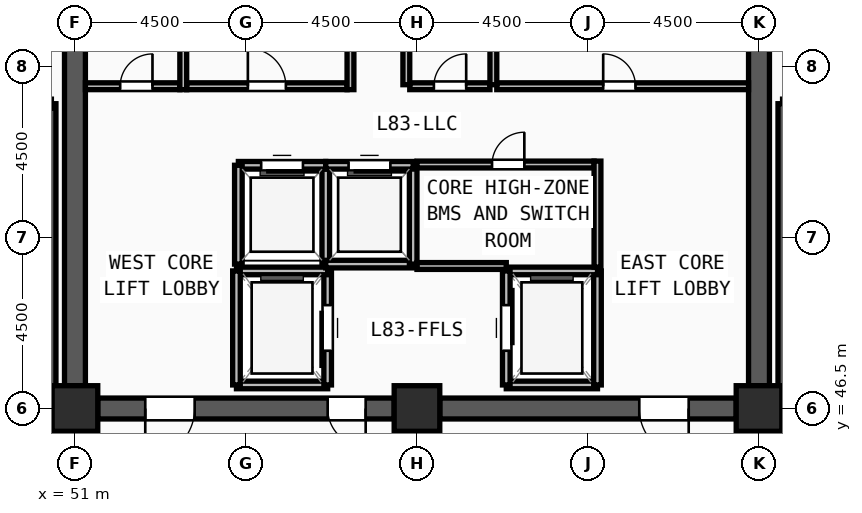
"""IFC4 building model, lengths in metres.
Left out: names, types, materials, properties, quantities, classifications, styles, units other than length and angle.
Written with IfcOpenShell. Run it as: python <this file> out.ifc"""

import sys

from ifc_helpers import new_model, si_unit, direction, frame, frame_2d, origin, origin_2d, place, context, subcontext, project, spatial, rectangle, extrude, source, transform, mapped, element, fill, save


model = new_model("IFC4")
c1 = context("Model", 3, precision=1e-05, world=origin(), true_north=direction((0.0, 1.0)))
c2 = subcontext(c1, "Body", "Model", "MODEL_VIEW")
j1 = project(units=[si_unit("LENGTHUNIT", "METRE"), si_unit("PLANEANGLEUNIT", "RADIAN")], contexts=[c1])
p1 = place(None, origin())
s1 = spatial("IfcSite", under=j1, at=p1, CompositionType="ELEMENT")
p2 = place(p1, origin())
s2 = spatial("IfcBuilding", under=s1, at=p2, CompositionType="ELEMENT")
p3 = place(p2, frame((0.0, 0.0, 320.25)))
s3 = spatial("IfcBuildingStorey", under=s2, at=p3, CompositionType="ELEMENT", Elevation=320.25)
m1 = source(origin(), c2, "Body", "SweptSolid", [
    extrude(rectangle(XDim=1.2, YDim=1.2, at=origin_2d()), origin(), (0.0, 0.0, 1.0), 3.75),
])
for number, where, z_axis, x_axis in (
    (1, (51.0, 46.5, 0.0), (0.0, 0.0, 1.0), (1.0, 0.0, 0.0)),
    (2, (60.0, 46.5, 0.0), (0.0, 0.0, 1.0), (1.0, 0.0, 0.0)),
    (3, (69.0, 46.5, 0.0), (0.0, 0.0, 1.0), (1.0, 0.0, 0.0)),
):
    element("IfcColumn", number, at=place(p3, frame(where, z_axis=z_axis, x_axis=x_axis)), inside=s3, PredefinedType="COLUMN", context=c2, shape_type="MappedRepresentation", body=[
        mapped(m1, transform((0.0, 0.0, 0.0), x_axis=(1.0, 0.0, 0.0), y_axis=(0.0, 1.0, 0.0), z_axis=(0.0, 0.0, 1.0), scale=1.0)),
    ])
p4 = place(p3, frame((69.0, 60.9, 0.0), z_axis=(0.0, 0.0, 1.0), x_axis=(0.0, -1.0, 0.0)))
e4 = element("IfcWall", 4, at=p4, inside=s3, PredefinedType="SHEAR", context=c2, shape_type="SweptSolid", body=[
    extrude(rectangle(XDim=13.8, YDim=0.55, at=frame_2d((6.9, 0.0))), origin(), (0.0, 0.0, 1.0), 3.47),
])
m2 = source(origin(), c2, "Body", "SweptSolid", [
    extrude(rectangle(XDim=1.2, YDim=2.2, at=frame_2d((0.6, 1.1))), frame((0.0, 0.285, 0.0), z_axis=(0.0, -1.0, 0.0), x_axis=(1.0, 0.0, 0.0)), (0.0, 0.0, 1.0), 0.57),
])
p5 = place(p4, frame((1.35, 0.0, 0.0)))
e5 = element("IfcOpeningElement", 5, at=p5, cuts=e4, PredefinedType="OPENING", context=c2, shape_type="MappedRepresentation", body=[
    mapped(m2, transform((0.0, 0.0, 0.0), x_axis=(1.0, 0.0, 0.0), y_axis=(0.0, 1.0, 0.0), z_axis=(0.0, 0.0, 1.0), scale=1.0)),
])
p6 = place(p3, frame((68.4, 46.5, 0.0), z_axis=(0.0, 0.0, 1.0), x_axis=(-1.0, 0.0, 0.0)))
e6 = element("IfcWall", 6, at=p6, inside=s3, PredefinedType="SHEAR", context=c2, shape_type="SweptSolid", body=[
    extrude(rectangle(XDim=7.8, YDim=0.55, at=frame_2d((3.9, 0.0))), origin(), (0.0, 0.0, 1.0), 3.47),
])
m3 = source(origin(), c2, "Body", "SweptSolid", [
    extrude(rectangle(XDim=1.3, YDim=2.2, at=frame_2d((0.65, 1.1))), frame((0.0, 0.285, 0.0), z_axis=(0.0, -1.0, 0.0), x_axis=(1.0, 0.0, 0.0)), (0.0, 0.0, 1.0), 0.57),
])
p7 = place(p6, frame((1.25, 0.0, 0.0)))
e7 = element("IfcOpeningElement", 7, at=p7, cuts=e6, PredefinedType="OPENING", context=c2, shape_type="MappedRepresentation", body=[
    mapped(m3, transform((0.0, 0.0, 0.0), x_axis=(1.0, 0.0, 0.0), y_axis=(0.0, 1.0, 0.0), z_axis=(0.0, 0.0, 1.0), scale=1.0)),
])
p8 = place(p3, frame((59.4, 46.5, 0.0), z_axis=(0.0, 0.0, 1.0), x_axis=(-1.0, 0.0, 0.0)))
e8 = element("IfcWall", 8, at=p8, inside=s3, PredefinedType="SHEAR", context=c2, shape_type="SweptSolid", body=[
    extrude(rectangle(XDim=7.8, YDim=0.55, at=frame_2d((3.9, 0.0))), origin(), (0.0, 0.0, 1.0), 3.47),
])
p9 = place(p8, frame((5.25, 0.0, 0.0)))
e9 = element("IfcOpeningElement", 9, at=p9, cuts=e8, PredefinedType="OPENING", context=c2, shape_type="MappedRepresentation", body=[
    mapped(m3, transform((0.0, 0.0, 0.0), x_axis=(1.0, 0.0, 0.0), y_axis=(0.0, 1.0, 0.0), z_axis=(0.0, 0.0, 1.0), scale=1.0)),
])
m4 = source(origin(), c2, "Body", "SweptSolid", [
    extrude(rectangle(XDim=1.0, YDim=2.2, at=frame_2d((0.5, 1.1))), frame((0.0, 0.285, 0.0), z_axis=(0.0, -1.0, 0.0), x_axis=(1.0, 0.0, 0.0)), (0.0, 0.0, 1.0), 0.57),
])
p10 = place(p8, frame((0.75, 0.0, 0.0)))
e10 = element("IfcOpeningElement", 10, at=p10, cuts=e8, PredefinedType="OPENING", context=c2, shape_type="MappedRepresentation", body=[
    mapped(m4, transform((0.0, 0.0, 0.0), x_axis=(1.0, 0.0, 0.0), y_axis=(0.0, 1.0, 0.0), z_axis=(0.0, 0.0, 1.0), scale=1.0)),
])
p11 = place(p3, frame((51.0, 47.1, 0.0), z_axis=(0.0, 0.0, 1.0), x_axis=(0.0, 1.0, 0.0)))
e11 = element("IfcWall", 11, at=p11, inside=s3, PredefinedType="SHEAR", context=c2, shape_type="SweptSolid", body=[
    extrude(rectangle(XDim=13.8, YDim=0.55, at=frame_2d((6.9, 0.0))), origin(), (0.0, 0.0, 1.0), 3.47),
])
for number, where, z_axis, x_axis in (
    (12, (50.38, 46.7, 0.0), (0.0, 0.0, 1.0), (0.0, 1.0, 0.0)),
    (13, (69.62, 54.52, 0.0), (0.0, 0.0, 1.0), (0.0, -1.0, 0.0)),
):
    element("IfcWall", number, at=place(p3, frame(where, z_axis=z_axis, x_axis=x_axis)), inside=s3, PredefinedType="SOLIDWALL", context=c2, shape_type="SweptSolid", body=[
        extrude(rectangle(XDim=7.82, YDim=0.24, at=frame_2d((3.91, 0.0))), origin(), (0.0, 0.0, 1.0), 3.47),
    ])
p12 = place(p3, frame((55.25, 47.12, 0.0), z_axis=(0.0, 0.0, 1.0), x_axis=(1.0, 0.0, 0.0)))
e14 = element("IfcWall", 14, at=p12, inside=s3, PredefinedType="SOLIDWALL", context=c2, shape_type="SweptSolid", body=[
    extrude(rectangle(XDim=2.4, YDim=0.2, at=frame_2d((1.2, 0.0))), origin(), (0.0, 0.0, 1.0), 3.47),
])
p13 = place(p3, frame((57.65, 47.12, 0.0), z_axis=(0.0, 0.0, 1.0), x_axis=(0.0, 1.0, 0.0)))
e15 = element("IfcWall", 15, at=p13, inside=s3, PredefinedType="SOLIDWALL", context=c2, shape_type="SweptSolid", body=[
    extrude(rectangle(XDim=3.0, YDim=0.2, at=frame_2d((1.5, 0.0))), origin(), (0.0, 0.0, 1.0), 3.47),
])
m5 = source(origin(), c2, "Body", "SweptSolid", [
    extrude(rectangle(XDim=1.2, YDim=2.3, at=frame_2d((0.6, 1.15))), frame((0.0, 0.11, 0.0), z_axis=(0.0, -1.0, 0.0), x_axis=(1.0, 0.0, 0.0)), (0.0, 0.0, 1.0), 0.22),
])
p14 = place(p13, frame((0.9, 0.0, 0.0)))
e16 = element("IfcOpeningElement", 16, at=p14, cuts=e15, PredefinedType="OPENING", context=c2, shape_type="MappedRepresentation", body=[
    mapped(m5, transform((0.0, 0.0, 0.0), x_axis=(1.0, 0.0, 0.0), y_axis=(0.0, 1.0, 0.0), z_axis=(0.0, 0.0, 1.0), scale=1.0)),
])
p15 = place(p3, frame((57.65, 50.12, 0.0), z_axis=(0.0, 0.0, 1.0), x_axis=(-1.0, 0.0, 0.0)))
e17 = element("IfcWall", 17, at=p15, inside=s3, PredefinedType="SOLIDWALL", context=c2, shape_type="SweptSolid", body=[
    extrude(rectangle(XDim=2.4, YDim=0.2, at=frame_2d((1.2, 0.0))), origin(), (0.0, 0.0, 1.0), 3.47),
])
p16 = place(p3, frame((55.25, 50.12, 0.0), z_axis=(0.0, 0.0, 1.0), x_axis=(0.0, -1.0, 0.0)))
e18 = element("IfcWall", 18, at=p16, inside=s3, PredefinedType="SOLIDWALL", context=c2, shape_type="SweptSolid", body=[
    extrude(rectangle(XDim=3.0, YDim=0.2, at=frame_2d((1.5, 0.0))), origin(), (0.0, 0.0, 1.0), 3.47),
])
p17 = place(p3, frame((62.35, 47.12, 0.0), z_axis=(0.0, 0.0, 1.0), x_axis=(1.0, 0.0, 0.0)))
e19 = element("IfcWall", 19, at=p17, inside=s3, PredefinedType="SOLIDWALL", context=c2, shape_type="SweptSolid", body=[
    extrude(rectangle(XDim=2.4, YDim=0.2, at=frame_2d((1.2, 0.0))), origin(), (0.0, 0.0, 1.0), 3.47),
])
p18 = place(p3, frame((64.75, 47.12, 0.0), z_axis=(0.0, 0.0, 1.0), x_axis=(0.0, 1.0, 0.0)))
e20 = element("IfcWall", 20, at=p18, inside=s3, PredefinedType="SOLIDWALL", context=c2, shape_type="SweptSolid", body=[
    extrude(rectangle(XDim=3.0, YDim=0.2, at=frame_2d((1.5, 0.0))), origin(), (0.0, 0.0, 1.0), 3.47),
])
p19 = place(p3, frame((64.75, 50.12, 0.0), z_axis=(0.0, 0.0, 1.0), x_axis=(-1.0, 0.0, 0.0)))
e21 = element("IfcWall", 21, at=p19, inside=s3, PredefinedType="SOLIDWALL", context=c2, shape_type="SweptSolid", body=[
    extrude(rectangle(XDim=2.4, YDim=0.2, at=frame_2d((1.2, 0.0))), origin(), (0.0, 0.0, 1.0), 3.47),
])
p20 = place(p3, frame((62.35, 50.12, 0.0), z_axis=(0.0, 0.0, 1.0), x_axis=(0.0, -1.0, 0.0)))
e22 = element("IfcWall", 22, at=p20, inside=s3, PredefinedType="SOLIDWALL", context=c2, shape_type="SweptSolid", body=[
    extrude(rectangle(XDim=3.0, YDim=0.2, at=frame_2d((1.5, 0.0))), origin(), (0.0, 0.0, 1.0), 3.47),
])
p21 = place(p20, frame((0.9, 0.0, 0.0)))
e23 = element("IfcOpeningElement", 23, at=p21, cuts=e22, PredefinedType="OPENING", context=c2, shape_type="MappedRepresentation", body=[
    mapped(m5, transform((0.0, 0.0, 0.0), x_axis=(1.0, 0.0, 0.0), y_axis=(0.0, 1.0, 0.0), z_axis=(0.0, 0.0, 1.0), scale=1.0)),
])
p22 = place(p3, frame((57.6, 50.3, 0.0), z_axis=(0.0, 0.0, 1.0), x_axis=(0.0, 1.0, 0.0)))
e24 = element("IfcWall", 24, at=p22, inside=s3, PredefinedType="SOLIDWALL", context=c2, shape_type="SweptSolid", body=[
    extrude(rectangle(XDim=2.6, YDim=0.2, at=frame_2d((1.3, 0.0))), origin(), (0.0, 0.0, 1.0), 3.47),
])
p23 = place(p3, frame((57.6, 52.9, 0.0), z_axis=(0.0, 0.0, 1.0), x_axis=(-1.0, 0.0, 0.0)))
e25 = element("IfcWall", 25, at=p23, inside=s3, PredefinedType="SOLIDWALL", context=c2, shape_type="SweptSolid", body=[
    extrude(rectangle(XDim=2.3, YDim=0.2, at=frame_2d((1.15, 0.0))), origin(), (0.0, 0.0, 1.0), 3.47),
])
m6 = source(origin(), c2, "Body", "SweptSolid", [
    extrude(rectangle(XDim=1.1, YDim=2.2, at=frame_2d((0.55, 1.1))), frame((0.0, 0.11, 0.0), z_axis=(0.0, -1.0, 0.0), x_axis=(1.0, 0.0, 0.0)), (0.0, 0.0, 1.0), 0.22),
])
p24 = place(p23, frame((0.6, 0.0, 0.0)))
e26 = element("IfcOpeningElement", 26, at=p24, cuts=e25, PredefinedType="OPENING", context=c2, shape_type="MappedRepresentation", body=[
    mapped(m6, transform((0.0, 0.0, 0.0), x_axis=(1.0, 0.0, 0.0), y_axis=(0.0, 1.0, 0.0), z_axis=(0.0, 0.0, 1.0), scale=1.0)),
])
p25 = place(p3, frame((55.3, 52.9, 0.0), z_axis=(0.0, 0.0, 1.0), x_axis=(0.0, -1.0, 0.0)))
e27 = element("IfcWall", 27, at=p25, inside=s3, PredefinedType="SOLIDWALL", context=c2, shape_type="SweptSolid", body=[
    extrude(rectangle(XDim=2.6, YDim=0.2, at=frame_2d((1.3, 0.0))), origin(), (0.0, 0.0, 1.0), 3.47),
])
p26 = place(p3, frame((57.6, 50.3, 0.0), z_axis=(0.0, 0.0, 1.0), x_axis=(1.0, 0.0, 0.0)))
e28 = element("IfcWall", 28, at=p26, inside=s3, PredefinedType="SOLIDWALL", context=c2, shape_type="SweptSolid", body=[
    extrude(rectangle(XDim=2.3, YDim=0.2, at=frame_2d((1.15, 0.0))), origin(), (0.0, 0.0, 1.0), 3.47),
])
p27 = place(p3, frame((59.9, 50.3, 0.0), z_axis=(0.0, 0.0, 1.0), x_axis=(0.0, 1.0, 0.0)))
e29 = element("IfcWall", 29, at=p27, inside=s3, PredefinedType="SOLIDWALL", context=c2, shape_type="SweptSolid", body=[
    extrude(rectangle(XDim=2.6, YDim=0.2, at=frame_2d((1.3, 0.0))), origin(), (0.0, 0.0, 1.0), 3.47),
])
p28 = place(p3, frame((59.9, 52.9, 0.0), z_axis=(0.0, 0.0, 1.0), x_axis=(-1.0, 0.0, 0.0)))
e30 = element("IfcWall", 30, at=p28, inside=s3, PredefinedType="SOLIDWALL", context=c2, shape_type="SweptSolid", body=[
    extrude(rectangle(XDim=2.3, YDim=0.2, at=frame_2d((1.15, 0.0))), origin(), (0.0, 0.0, 1.0), 3.47),
])
p29 = place(p28, frame((0.6, 0.0, 0.0)))
e31 = element("IfcOpeningElement", 31, at=p29, cuts=e30, PredefinedType="OPENING", context=c2, shape_type="MappedRepresentation", body=[
    mapped(m6, transform((0.0, 0.0, 0.0), x_axis=(1.0, 0.0, 0.0), y_axis=(0.0, 1.0, 0.0), z_axis=(0.0, 0.0, 1.0), scale=1.0)),
])
p30 = place(p3, frame((60.0, 52.92, 0.0), z_axis=(0.0, 0.0, 1.0), x_axis=(1.0, 0.0, 0.0)))
e32 = element("IfcWall", 32, at=p30, inside=s3, PredefinedType="PARTITIONING", context=c2, shape_type="SweptSolid", body=[
    extrude(rectangle(XDim=4.66, YDim=0.18, at=frame_2d((2.33, 0.0))), origin(), (0.0, 0.0, 1.0), 3.47),
])
m7 = source(origin(), c2, "Body", "SweptSolid", [
    extrude(rectangle(XDim=0.85, YDim=2.1, at=frame_2d((0.425, 1.05))), frame((0.0, 0.1, 0.0), z_axis=(0.0, -1.0, 0.0), x_axis=(1.0, 0.0, 0.0)), (0.0, 0.0, 1.0), 0.2),
])
p31 = place(p30, frame((1.975, 0.0, 0.0)))
e33 = element("IfcOpeningElement", 33, at=p31, cuts=e32, PredefinedType="OPENING", context=c2, shape_type="MappedRepresentation", body=[
    mapped(m7, transform((0.0, 0.0, 0.0), x_axis=(1.0, 0.0, 0.0), y_axis=(0.0, 1.0, 0.0), z_axis=(0.0, 0.0, 1.0), scale=1.0)),
])
p32 = place(p3, frame((53.94, 54.98, 0.0), z_axis=(0.0, 0.0, 1.0), x_axis=(1.0, 0.0, 0.0)))
e34 = element("IfcWall", 34, at=p32, inside=s3, PredefinedType="PARTITIONING", context=c2, shape_type="SweptSolid", body=[
    extrude(rectangle(XDim=4.22, YDim=0.18, at=frame_2d((2.11, 0.0))), origin(), (0.0, 0.0, 1.0), 3.47),
])
m8 = source(origin(), c2, "Body", "SweptSolid", [
    extrude(rectangle(XDim=1.0, YDim=2.2, at=frame_2d((0.5, 1.1))), frame((0.0, 0.1, 0.0), z_axis=(0.0, -1.0, 0.0), x_axis=(1.0, 0.0, 0.0)), (0.0, 0.0, 1.0), 0.2),
])
p33 = place(p32, frame((1.61, 0.0, 0.0)))
e35 = element("IfcOpeningElement", 35, at=p33, cuts=e34, PredefinedType="OPENING", context=c2, shape_type="MappedRepresentation", body=[
    mapped(m8, transform((0.0, 0.0, 0.0), x_axis=(1.0, 0.0, 0.0), y_axis=(0.0, 1.0, 0.0), z_axis=(0.0, 0.0, 1.0), scale=1.0)),
])
p34 = place(p3, frame((51.275, 54.98, 0.0), z_axis=(0.0, 0.0, 1.0), x_axis=(1.0, 0.0, 0.0)))
e36 = element("IfcWall", 36, at=p34, inside=s3, PredefinedType="PARTITIONING", context=c2, shape_type="SweptSolid", body=[
    extrude(rectangle(XDim=2.485, YDim=0.18, at=frame_2d((1.243, 0.0))), origin(), (0.0, 0.0, 1.0), 3.47),
])
p35 = place(p34, frame((0.915, 0.0, 0.0)))
e37 = element("IfcOpeningElement", 37, at=p35, cuts=e36, PredefinedType="OPENING", context=c2, shape_type="MappedRepresentation", body=[
    mapped(m7, transform((0.0, 0.0, 0.0), x_axis=(1.0, 0.0, 0.0), y_axis=(0.0, 1.0, 0.0), z_axis=(0.0, 0.0, 1.0), scale=1.0)),
])
p36 = place(p3, frame((62.1, 54.98, 0.0), z_axis=(0.0, 0.0, 1.0), x_axis=(1.0, 0.0, 0.0)))
e38 = element("IfcWall", 38, at=p36, inside=s3, PredefinedType="PARTITIONING", context=c2, shape_type="SweptSolid", body=[
    extrude(rectangle(XDim=6.625, YDim=0.18, at=frame_2d((3.312, 0.0))), origin(), (0.0, 0.0, 1.0), 3.47),
])
p37 = place(p36, frame((2.8, 0.0, 0.0)))
e39 = element("IfcOpeningElement", 39, at=p37, cuts=e38, PredefinedType="OPENING", context=c2, shape_type="MappedRepresentation", body=[
    mapped(m7, transform((0.0, 0.0, 0.0), x_axis=(1.0, 0.0, 0.0), y_axis=(0.0, 1.0, 0.0), z_axis=(0.0, 0.0, 1.0), scale=1.0)),
])
p38 = place(p3, frame((59.81, 54.98, 0.0), z_axis=(0.0, 0.0, 1.0), x_axis=(1.0, 0.0, 0.0)))
e40 = element("IfcWall", 40, at=p38, inside=s3, PredefinedType="PARTITIONING", context=c2, shape_type="SweptSolid", body=[
    extrude(rectangle(XDim=2.11, YDim=0.18, at=frame_2d((1.055, 0.0))), origin(), (0.0, 0.0, 1.0), 3.47),
])
p39 = place(p38, frame((0.635, 0.0, 0.0)))
e41 = element("IfcOpeningElement", 41, at=p39, cuts=e40, PredefinedType="OPENING", context=c2, shape_type="MappedRepresentation", body=[
    mapped(m7, transform((0.0, 0.0, 0.0), x_axis=(1.0, 0.0, 0.0), y_axis=(0.0, 1.0, 0.0), z_axis=(0.0, 0.0, 1.0), scale=1.0)),
])
for number, where, z_axis, x_axis in (
    (42, (59.72, 55.02, 0.0), (0.0, 0.0, 1.0), (0.0, 1.0, 0.0)),
    (43, (62.01, 55.02, 0.0), (0.0, 0.0, 1.0), (0.0, 1.0, 0.0)),
):
    element("IfcWall", number, at=place(p3, frame(where, z_axis=z_axis, x_axis=x_axis)), inside=s3, PredefinedType="PARTITIONING", context=c2, shape_type="SweptSolid", body=[
        extrude(rectangle(XDim=2.88, YDim=0.18, at=frame_2d((1.44, 0.0))), origin(), (0.0, 0.0, 1.0), 3.47),
    ])
p40 = place(p3, frame((64.75, 50.22, 0.0), z_axis=(0.0, 0.0, 1.0), x_axis=(0.0, 1.0, 0.0)))
e44 = element("IfcWall", 44, at=p40, inside=s3, PredefinedType="PARTITIONING", context=c2, shape_type="SweptSolid", body=[
    extrude(rectangle(XDim=2.79, YDim=0.18, at=frame_2d((1.395, 0.0))), origin(), (0.0, 0.0, 1.0), 3.47),
])
p41 = place(p3, frame((60.0, 50.25, 0.0), z_axis=(0.0, 0.0, 1.0), x_axis=(1.0, 0.0, 0.0)))
e45 = element("IfcWall", 45, at=p41, inside=s3, PredefinedType="PARTITIONING", context=c2, shape_type="SweptSolid", body=[
    extrude(rectangle(XDim=2.35, YDim=0.18, at=frame_2d((1.175, 0.0))), origin(), (0.0, 0.0, 1.0), 3.47),
])
for number, where, z_axis, x_axis in (
    (46, (53.85, 54.89, 0.0), (0.0, 0.0, 1.0), (0.0, 1.0, 0.0)),
    (47, (58.25, 54.89, 0.0), (0.0, 0.0, 1.0), (0.0, 1.0, 0.0)),
):
    element("IfcWall", number, at=place(p3, frame(where, z_axis=z_axis, x_axis=x_axis)), inside=s3, PredefinedType="PARTITIONING", context=c2, shape_type="SweptSolid", body=[
        extrude(rectangle(XDim=3.02, YDim=0.18, at=frame_2d((1.51, 0.0))), origin(), (0.0, 0.0, 1.0), 3.47),
    ])
m9 = source(origin(), c2, "Body", "SweptSolid", [
    extrude(rectangle(XDim=1.3, YDim=2.2, at=frame_2d((0.65, 1.1))), frame((0.0, 0.025, 0.0), z_axis=(0.0, -1.0, 0.0), x_axis=(1.0, 0.0, 0.0)), (0.0, 0.0, 1.0), 0.05),
])
p42 = place(p9, origin())
e48 = element("IfcDoor", 48, at=p42, inside=s3, OperationType="SINGLE_SWING_RIGHT", PredefinedType="DOOR", context=c2, shape_type="MappedRepresentation", body=[
    mapped(m9, transform((0.0, 0.0, 0.0), x_axis=(1.0, 0.0, 0.0), y_axis=(0.0, 1.0, 0.0), z_axis=(0.0, 0.0, 1.0), scale=1.0)),
])
fill(e9, e48)
m10 = source(origin(), c2, "Body", "SweptSolid", [
    extrude(rectangle(XDim=1.0, YDim=2.2, at=frame_2d((0.5, 1.1))), frame((0.0, 0.025, 0.0), z_axis=(0.0, -1.0, 0.0), x_axis=(1.0, 0.0, 0.0)), (0.0, 0.0, 1.0), 0.05),
])
p43 = place(p10, origin())
e49 = element("IfcDoor", 49, at=p43, inside=s3, OperationType="SINGLE_SWING_LEFT", PredefinedType="DOOR", context=c2, shape_type="MappedRepresentation", body=[
    mapped(m10, transform((0.0, 0.0, 0.0), x_axis=(1.0, 0.0, 0.0), y_axis=(0.0, 1.0, 0.0), z_axis=(0.0, 0.0, 1.0), scale=1.0)),
])
fill(e10, e49)
p44 = place(p7, origin())
e50 = element("IfcDoor", 50, at=p44, inside=s3, OperationType="SINGLE_SWING_LEFT", PredefinedType="DOOR", context=c2, shape_type="MappedRepresentation", body=[
    mapped(m9, transform((0.0, 0.0, 0.0), x_axis=(1.0, 0.0, 0.0), y_axis=(0.0, 1.0, 0.0), z_axis=(0.0, 0.0, 1.0), scale=1.0)),
])
fill(e7, e50)
m11 = source(origin(), c2, "Body", "SweptSolid", [
    extrude(rectangle(XDim=1.2, YDim=2.3, at=frame_2d((0.6, 1.15))), frame((0.0, 0.025, 0.0), z_axis=(0.0, -1.0, 0.0), x_axis=(1.0, 0.0, 0.0)), (0.0, 0.0, 1.0), 0.05),
])
p45 = place(p14, origin())
e51 = element("IfcDoor", 51, at=p45, inside=s3, OperationType="SLIDING_TO_LEFT", PredefinedType="DOOR", context=c2, shape_type="MappedRepresentation", body=[
    mapped(m11, transform((0.0, 0.0, 0.0), x_axis=(1.0, 0.0, 0.0), y_axis=(0.0, 1.0, 0.0), z_axis=(0.0, 0.0, 1.0), scale=1.0)),
])
fill(e16, e51)
p46 = place(p21, origin())
e52 = element("IfcDoor", 52, at=p46, inside=s3, OperationType="SLIDING_TO_LEFT", PredefinedType="DOOR", context=c2, shape_type="MappedRepresentation", body=[
    mapped(m11, transform((0.0, 0.0, 0.0), x_axis=(1.0, 0.0, 0.0), y_axis=(0.0, 1.0, 0.0), z_axis=(0.0, 0.0, 1.0), scale=1.0)),
])
fill(e23, e52)
m12 = source(origin(), c2, "Body", "SweptSolid", [
    extrude(rectangle(XDim=1.1, YDim=2.2, at=frame_2d((0.55, 1.1))), frame((0.0, 0.025, 0.0), z_axis=(0.0, -1.0, 0.0), x_axis=(1.0, 0.0, 0.0)), (0.0, 0.0, 1.0), 0.05),
])
p47 = place(p24, origin())
e53 = element("IfcDoor", 53, at=p47, inside=s3, OperationType="SLIDING_TO_LEFT", PredefinedType="DOOR", context=c2, shape_type="MappedRepresentation", body=[
    mapped(m12, transform((0.0, 0.0, 0.0), x_axis=(1.0, 0.0, 0.0), y_axis=(0.0, 1.0, 0.0), z_axis=(0.0, 0.0, 1.0), scale=1.0)),
])
fill(e26, e53)
p48 = place(p29, origin())
e54 = element("IfcDoor", 54, at=p48, inside=s3, OperationType="SLIDING_TO_LEFT", PredefinedType="DOOR", context=c2, shape_type="MappedRepresentation", body=[
    mapped(m12, transform((0.0, 0.0, 0.0), x_axis=(1.0, 0.0, 0.0), y_axis=(0.0, 1.0, 0.0), z_axis=(0.0, 0.0, 1.0), scale=1.0)),
])
fill(e31, e54)
m13 = source(origin(), c2, "Body", "SweptSolid", [
    extrude(rectangle(XDim=0.85, YDim=2.1, at=frame_2d((0.425, 1.05))), frame((0.0, 0.025, 0.0), z_axis=(0.0, -1.0, 0.0), x_axis=(1.0, 0.0, 0.0)), (0.0, 0.0, 1.0), 0.05),
])
p49 = place(p31, origin())
e55 = element("IfcDoor", 55, at=p49, inside=s3, OperationType="SINGLE_SWING_RIGHT", PredefinedType="DOOR", context=c2, shape_type="MappedRepresentation", body=[
    mapped(m13, transform((0.0, 0.0, 0.0), x_axis=(1.0, 0.0, 0.0), y_axis=(0.0, 1.0, 0.0), z_axis=(0.0, 0.0, 1.0), scale=1.0)),
])
fill(e33, e55)
p50 = place(p33, origin())
e56 = element("IfcDoor", 56, at=p50, inside=s3, OperationType="SINGLE_SWING_LEFT", PredefinedType="DOOR", context=c2, shape_type="MappedRepresentation", body=[
    mapped(m10, transform((0.0, 0.0, 0.0), x_axis=(1.0, 0.0, 0.0), y_axis=(0.0, 1.0, 0.0), z_axis=(0.0, 0.0, 1.0), scale=1.0)),
])
fill(e35, e56)
p51 = place(p35, origin())
e57 = element("IfcDoor", 57, at=p51, inside=s3, OperationType="SINGLE_SWING_RIGHT", PredefinedType="DOOR", context=c2, shape_type="MappedRepresentation", body=[
    mapped(m13, transform((0.0, 0.0, 0.0), x_axis=(1.0, 0.0, 0.0), y_axis=(0.0, 1.0, 0.0), z_axis=(0.0, 0.0, 1.0), scale=1.0)),
])
fill(e37, e57)
p52 = place(p37, origin())
e58 = element("IfcDoor", 58, at=p52, inside=s3, OperationType="SINGLE_SWING_LEFT", PredefinedType="DOOR", context=c2, shape_type="MappedRepresentation", body=[
    mapped(m13, transform((0.0, 0.0, 0.0), x_axis=(1.0, 0.0, 0.0), y_axis=(0.0, 1.0, 0.0), z_axis=(0.0, 0.0, 1.0), scale=1.0)),
])
fill(e39, e58)
p53 = place(p39, origin())
e59 = element("IfcDoor", 59, at=p53, inside=s3, OperationType="SINGLE_SWING_RIGHT", PredefinedType="DOOR", context=c2, shape_type="MappedRepresentation", body=[
    mapped(m13, transform((0.0, 0.0, 0.0), x_axis=(1.0, 0.0, 0.0), y_axis=(0.0, 1.0, 0.0), z_axis=(0.0, 0.0, 1.0), scale=1.0)),
])
fill(e41, e59)
save(model, sys.argv[1])
